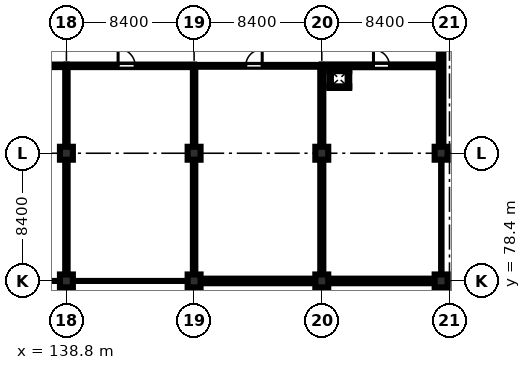
"""IFC4 building model, lengths in metres.
Left out: names, types, materials, properties, quantities, classifications, styles, units other than length and angle.
Written with IfcOpenShell. Run it as: python <this file> out.ifc"""

import sys

from ifc_helpers import new_model, si_unit, direction, frame, frame_2d, origin, origin_2d, place, context, subcontext, project, spatial, rectangle, extrude, element, fill, save


model = new_model("IFC4")
c1 = context("Model", 3, precision=1e-05, world=origin(), true_north=direction((0.0, 1.0)))
c2 = subcontext(c1, "Body", "Model", "MODEL_VIEW")
j1 = project(units=[si_unit("LENGTHUNIT", "METRE"), si_unit("PLANEANGLEUNIT", "RADIAN")], contexts=[c1])
p1 = place(None, origin())
s1 = spatial("IfcSite", under=j1, at=p1, CompositionType="ELEMENT")
p2 = place(p1, origin())
s2 = spatial("IfcBuilding", under=s1, at=p2, CompositionType="ELEMENT")
p3 = place(p2, frame((0.0, 0.0, 23.4)))
s3 = spatial("IfcBuildingStorey", under=s2, at=p3, CompositionType="ELEMENT", Elevation=23.4)
for number, where, z_axis, x_axis in (
    (1, (138.8, 78.4, 0.0), (0.0, 0.0, 1.0), (1.0, 0.0, 0.0)),
    (2, (138.8, 86.8, 0.0), (0.0, 0.0, 1.0), (1.0, 0.0, 0.0)),
    (3, (147.2, 78.4, 0.0), (0.0, 0.0, 1.0), (1.0, 0.0, 0.0)),
    (4, (147.2, 86.8, 0.0), (0.0, 0.0, 1.0), (1.0, 0.0, 0.0)),
    (5, (155.6, 78.4, 0.0), (0.0, 0.0, 1.0), (1.0, 0.0, 0.0)),
    (6, (155.6, 86.8, 0.0), (0.0, 0.0, 1.0), (1.0, 0.0, 0.0)),
    (7, (163.45, 78.4, 0.0), (0.0, 0.0, 1.0), (1.0, 0.0, 0.0)),
    (8, (163.45, 86.8, 0.0), (0.0, 0.0, 1.0), (1.0, 0.0, 0.0)),
):
    element("IfcColumn", number, at=place(p3, frame(where, z_axis=z_axis, x_axis=x_axis)), inside=s3, PredefinedType="COLUMN", context=c2, shape_type="SweptSolid", body=[
        extrude(rectangle(XDim=0.85, YDim=0.85, at=origin_2d()), origin(), (0.0, 0.0, 1.0), 4.0),
    ])
p4 = place(p3, frame((155.175, 78.4, 0.0), z_axis=(0.0, 0.0, 1.0), x_axis=(-1.0, 0.0, 0.0)))
e9 = element("IfcWall", 9, at=p4, inside=s3, PredefinedType="STANDARD", context=c2, shape_type="SweptSolid", body=[
    extrude(rectangle(XDim=7.55, YDim=0.3, at=frame_2d((3.775, 0.0))), origin(), (0.0, 0.0, 1.0), 3.3),
])
p5 = place(p4, frame((1.15, 0.0, 0.95)))
e10 = element("IfcOpeningElement", 10, at=p5, cuts=e9, PredefinedType="OPENING", context=c2, shape_type="SweptSolid", body=[
    extrude(rectangle(XDim=1.7, YDim=2.05, at=frame_2d((0.85, 1.025))), frame((0.0, 0.16, 0.0), z_axis=(0.0, -1.0, 0.0), x_axis=(1.0, 0.0, 0.0)), (0.0, 0.0, 1.0), 0.32),
])
p6 = place(p3, frame((163.025, 78.4, 0.0), z_axis=(0.0, 0.0, 1.0), x_axis=(-1.0, 0.0, 0.0)))
e11 = element("IfcWall", 11, at=p6, inside=s3, PredefinedType="STANDARD", context=c2, shape_type="SweptSolid", body=[
    extrude(rectangle(XDim=7.0, YDim=0.3, at=frame_2d((3.5, 0.0))), origin(), (0.0, 0.0, 1.0), 3.3),
])
p7 = place(p6, frame((1.15, 0.0, 0.95)))
e12 = element("IfcOpeningElement", 12, at=p7, cuts=e11, PredefinedType="OPENING", context=c2, shape_type="SweptSolid", body=[
    extrude(rectangle(XDim=1.7, YDim=2.05, at=frame_2d((0.85, 1.025))), frame((0.0, 0.16, 0.0), z_axis=(0.0, -1.0, 0.0), x_axis=(1.0, 0.0, 0.0)), (0.0, 0.0, 1.0), 0.32),
])
p8 = place(p3, frame((163.45, 94.775, 0.0), z_axis=(0.0, 0.0, 1.0), x_axis=(0.0, -1.0, 0.0)))
e13 = element("IfcWall", 13, at=p8, inside=s3, PredefinedType="STANDARD", context=c2, shape_type="SweptSolid", body=[
    extrude(rectangle(XDim=7.55, YDim=0.3, at=frame_2d((3.775, 0.0))), origin(), (0.0, 0.0, 1.0), 3.3),
])
p9 = place(p8, frame((4.2, 0.0, 1.1)))
e14 = element("IfcOpeningElement", 14, at=p9, cuts=e13, PredefinedType="OPENING", context=c2, shape_type="SweptSolid", body=[
    extrude(rectangle(XDim=1.55, YDim=1.75, at=frame_2d((0.775, 0.875))), frame((0.0, 0.16, 0.0), z_axis=(0.0, -1.0, 0.0), x_axis=(1.0, 0.0, 0.0)), (0.0, 0.0, 1.0), 0.32),
])
p10 = place(p3, frame((122.15, 92.55, 0.0), z_axis=(0.0, 0.0, 1.0), x_axis=(1.0, 0.0, 0.0)))
e15 = element("IfcWall", 15, at=p10, inside=s3, PredefinedType="PARTITIONING", context=c2, shape_type="SweptSolid", body=[
    extrude(rectangle(XDim=16.65, YDim=0.165, at=frame_2d((8.325, 0.0))), origin(), (0.0, 0.0, 1.0), 4.0),
])
p11 = place(p10, frame((3.75, 0.0, 0.0)))
e16 = element("IfcOpeningElement", 16, at=p11, cuts=e15, PredefinedType="OPENING", context=c2, shape_type="SweptSolid", body=[
    extrude(rectangle(XDim=1.46, YDim=2.22, at=frame_2d((0.73, 1.11))), frame((0.0, 0.093, 0.0), z_axis=(0.0, -1.0, 0.0), x_axis=(1.0, 0.0, 0.0)), (0.0, 0.0, 1.0), 0.185),
])
p12 = place(p3, frame((138.8, 92.55, 0.0), z_axis=(0.0, 0.0, 1.0), x_axis=(1.0, 0.0, 0.0)))
e17 = element("IfcWall", 17, at=p12, inside=s3, PredefinedType="PARTITIONING", context=c2, shape_type="SweptSolid", body=[
    extrude(rectangle(XDim=8.4, YDim=0.165, at=frame_2d((4.2, 0.0))), origin(), (0.0, 0.0, 1.0), 4.0),
])
p13 = place(p12, frame((3.4, 0.0, 0.0)))
e18 = element("IfcOpeningElement", 18, at=p13, cuts=e17, PredefinedType="OPENING", context=c2, shape_type="SweptSolid", body=[
    extrude(rectangle(XDim=1.12, YDim=2.18, at=frame_2d((0.56, 1.09))), frame((0.0, 0.093, 0.0), z_axis=(0.0, -1.0, 0.0), x_axis=(1.0, 0.0, 0.0)), (0.0, 0.0, 1.0), 0.185),
])
p14 = place(p3, frame((138.8, 78.55, 0.0), z_axis=(0.0, 0.0, 1.0), x_axis=(0.0, 1.0, 0.0)))
e19 = element("IfcWall", 19, at=p14, inside=s3, PredefinedType="PARTITIONING", context=c2, shape_type="SweptSolid", body=[
    extrude(rectangle(XDim=14.0, YDim=0.158, at=frame_2d((7.0, 0.0))), origin(), (0.0, 0.0, 1.0), 3.3),
])
p15 = place(p3, frame((147.2, 92.55, 0.0), z_axis=(0.0, 0.0, 1.0), x_axis=(1.0, 0.0, 0.0)))
e20 = element("IfcWall", 20, at=p15, inside=s3, PredefinedType="PARTITIONING", context=c2, shape_type="SweptSolid", body=[
    extrude(rectangle(XDim=8.4, YDim=0.12, at=frame_2d((4.2, 0.0))), origin(), (0.0, 0.0, 1.0), 4.0),
])
p16 = place(p15, frame((3.4, 0.0, 0.0)))
e21 = element("IfcOpeningElement", 21, at=p16, cuts=e20, PredefinedType="OPENING", context=c2, shape_type="SweptSolid", body=[
    extrude(rectangle(XDim=1.08, YDim=2.15, at=frame_2d((0.54, 1.075))), frame((0.0, 0.07, 0.0), z_axis=(0.0, -1.0, 0.0), x_axis=(1.0, 0.0, 0.0)), (0.0, 0.0, 1.0), 0.14),
])
p17 = place(p3, frame((147.2, 78.55, 0.0), z_axis=(0.0, 0.0, 1.0), x_axis=(0.0, 1.0, 0.0)))
e22 = element("IfcWall", 22, at=p17, inside=s3, PredefinedType="PARTITIONING", context=c2, shape_type="SweptSolid", body=[
    extrude(rectangle(XDim=14.0, YDim=0.158, at=frame_2d((7.0, 0.0))), origin(), (0.0, 0.0, 1.0), 3.3),
])
p18 = place(p3, frame((155.6, 92.55, 0.0), z_axis=(0.0, 0.0, 1.0), x_axis=(1.0, 0.0, 0.0)))
e23 = element("IfcWall", 23, at=p18, inside=s3, PredefinedType="STANDARD", context=c2, shape_type="SweptSolid", body=[
    extrude(rectangle(XDim=7.75, YDim=0.18, at=frame_2d((3.875, 0.0))), origin(), (0.0, 0.0, 1.0), 4.0),
])
p19 = place(p18, frame((3.4, 0.0, 0.0)))
e24 = element("IfcOpeningElement", 24, at=p19, cuts=e23, PredefinedType="OPENING", context=c2, shape_type="SweptSolid", body=[
    extrude(rectangle(XDim=1.05, YDim=2.15, at=frame_2d((0.525, 1.075))), frame((0.0, 0.1, 0.0), z_axis=(0.0, -1.0, 0.0), x_axis=(1.0, 0.0, 0.0)), (0.0, 0.0, 1.0), 0.2),
])
p20 = place(p3, frame((155.6, 78.55, 0.0), z_axis=(0.0, 0.0, 1.0), x_axis=(0.0, 1.0, 0.0)))
e25 = element("IfcWall", 25, at=p20, inside=s3, PredefinedType="SOLIDWALL", context=c2, shape_type="SweptSolid", body=[
    extrude(rectangle(XDim=14.0, YDim=0.2, at=frame_2d((7.0, 0.0))), origin(), (0.0, 0.0, 1.0), 3.3),
])
for number, where, z_axis, x_axis in (
    (26, (156.095, 91.147, 0.0), (0.0, 0.0, 1.0), (1.0, 0.0, 0.0)),
    (27, (156.095, 92.252, 0.0), (0.0, 0.0, 1.0), (1.0, 0.0, 0.0)),
):
    element("IfcWall", number, at=place(p3, frame(where, z_axis=z_axis, x_axis=x_axis)), inside=s3, PredefinedType="PARTITIONING", context=c2, shape_type="SweptSolid", body=[
        extrude(rectangle(XDim=1.31, YDim=0.105, at=frame_2d((0.655, 0.0))), origin(), (0.0, 0.0, 1.0), 4.0),
    ])
for number, where, z_axis, x_axis in (
    (28, (156.147, 91.2, 0.0), (0.0, 0.0, 1.0), (0.0, 1.0, 0.0)),
    (29, (157.353, 91.2, 0.0), (0.0, 0.0, 1.0), (0.0, 1.0, 0.0)),
):
    element("IfcWall", number, at=place(p3, frame(where, z_axis=z_axis, x_axis=x_axis)), inside=s3, PredefinedType="PARTITIONING", context=c2, shape_type="SweptSolid", body=[
        extrude(rectangle(XDim=1.0, YDim=0.105, at=frame_2d((0.5, 0.0))), origin(), (0.0, 0.0, 1.0), 4.0),
    ])
p21 = place(p5, origin())
e30 = element("IfcWindow", 30, at=p21, inside=s3, PartitioningType="DOUBLE_PANEL_VERTICAL", PredefinedType="WINDOW", context=c2, shape_type="SweptSolid", body=[
    extrude(rectangle(XDim=1.7, YDim=2.05, at=frame_2d((0.85, 1.025))), frame((0.0, 0.03, 0.0), z_axis=(0.0, -1.0, 0.0), x_axis=(1.0, 0.0, 0.0)), (0.0, 0.0, 1.0), 0.06),
])
fill(e10, e30)
p22 = place(p7, origin())
e31 = element("IfcWindow", 31, at=p22, inside=s3, PartitioningType="DOUBLE_PANEL_VERTICAL", PredefinedType="WINDOW", context=c2, shape_type="SweptSolid", body=[
    extrude(rectangle(XDim=1.7, YDim=2.05, at=frame_2d((0.85, 1.025))), frame((0.0, 0.03, 0.0), z_axis=(0.0, -1.0, 0.0), x_axis=(1.0, 0.0, 0.0)), (0.0, 0.0, 1.0), 0.06),
])
fill(e12, e31)
p23 = place(p9, origin())
e32 = element("IfcWindow", 32, at=p23, inside=s3, PartitioningType="DOUBLE_PANEL_VERTICAL", PredefinedType="WINDOW", context=c2, shape_type="SweptSolid", body=[
    extrude(rectangle(XDim=1.55, YDim=1.75, at=frame_2d((0.775, 0.875))), frame((0.0, 0.03, 0.0), z_axis=(0.0, -1.0, 0.0), x_axis=(1.0, 0.0, 0.0)), (0.0, 0.0, 1.0), 0.06),
])
fill(e14, e32)
p24 = place(p13, origin())
e33 = element("IfcDoor", 33, at=p24, inside=s3, OperationType="SINGLE_SWING_LEFT", PredefinedType="DOOR", context=c2, shape_type="SweptSolid", body=[
    extrude(rectangle(XDim=1.12, YDim=2.18, at=frame_2d((0.56, 1.09))), frame((0.0, 0.025, 0.0), z_axis=(0.0, -1.0, 0.0), x_axis=(1.0, 0.0, 0.0)), (0.0, 0.0, 1.0), 0.05),
])
fill(e18, e33)
p25 = place(p16, origin())
e34 = element("IfcDoor", 34, at=p25, inside=s3, OperationType="SINGLE_SWING_RIGHT", PredefinedType="DOOR", context=c2, shape_type="SweptSolid", body=[
    extrude(rectangle(XDim=1.08, YDim=2.15, at=frame_2d((0.54, 1.075))), frame((0.0, 0.025, 0.0), z_axis=(0.0, -1.0, 0.0), x_axis=(1.0, 0.0, 0.0)), (0.0, 0.0, 1.0), 0.05),
])
fill(e21, e34)
p26 = place(p19, origin())
e35 = element("IfcDoor", 35, at=p26, inside=s3, OperationType="SINGLE_SWING_LEFT", PredefinedType="DOOR", context=c2, shape_type="SweptSolid", body=[
    extrude(rectangle(XDim=1.05, YDim=2.15, at=frame_2d((0.525, 1.075))), frame((0.0, 0.025, 0.0), z_axis=(0.0, -1.0, 0.0), x_axis=(1.0, 0.0, 0.0)), (0.0, 0.0, 1.0), 0.05),
])
fill(e24, e35)
save(model, sys.argv[1])
